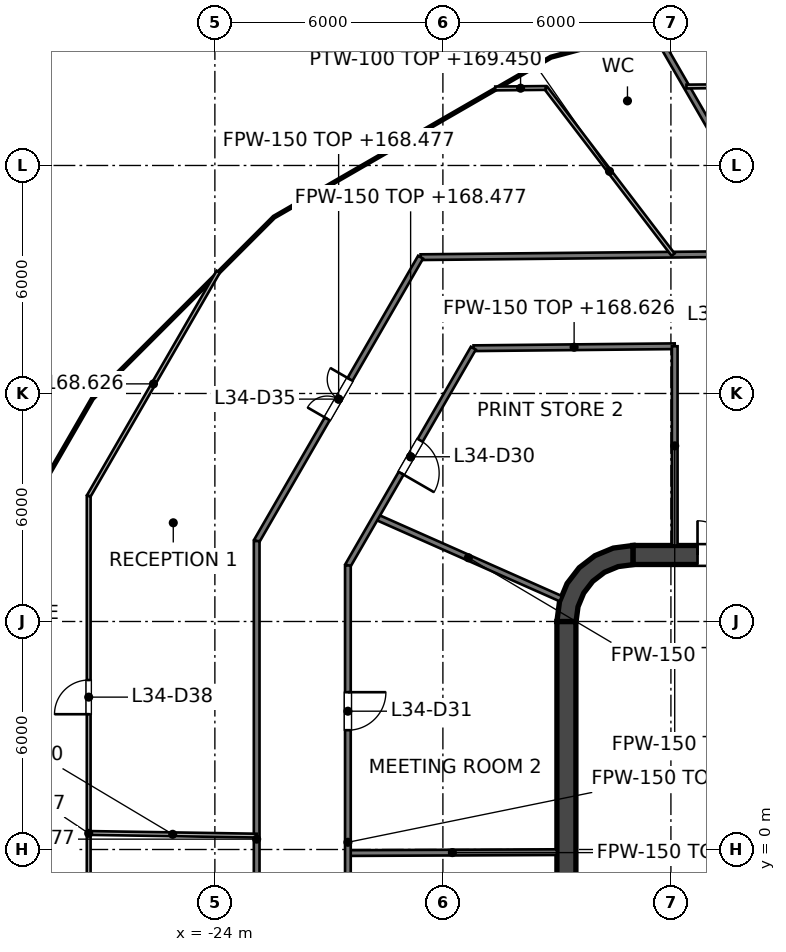
"""IFC4 building model, lengths in metres.
Left out: names, types, materials, properties, quantities, classifications, styles, units other than length and angle.
Written with IfcOpenShell. Run it as: python <this file> out.ifc"""

import sys

from ifc_helpers import new_model, si_unit, direction, frame, frame_2d, origin, place, context, subcontext, project, spatial, polyline, rectangle, outline, extrude, element, fill, save


model = new_model("IFC4")
c1 = context("Model", 3, precision=1e-05, world=origin(), true_north=direction((0.0, 1.0)))
c2 = subcontext(c1, "Body", "Model", "MODEL_VIEW")
j1 = project(units=[si_unit("LENGTHUNIT", "METRE"), si_unit("PLANEANGLEUNIT", "RADIAN")], contexts=[c1])
p1 = place(None, origin())
s1 = spatial("IfcSite", under=j1, at=p1, CompositionType="ELEMENT")
p2 = place(p1, origin())
s2 = spatial("IfcBuilding", under=s1, at=p2, CompositionType="ELEMENT")
p3 = place(p2, frame((0.0, 0.0, 165.6)))
s3 = spatial("IfcBuildingStorey", under=s2, at=p3, CompositionType="ELEMENT", Elevation=165.6)
p4 = place(p3, frame((-13.0, 7.75, 0.0), z_axis=(0.0, 0.0, 1.0), x_axis=(1.0, 0.0, 0.0)))
e1 = element("IfcWall", 1, at=p4, inside=s3, PredefinedType="SHEAR", context=c2, shape_type="SweptSolid", body=[
    extrude(rectangle(XDim=26.0, YDim=0.5, at=frame_2d((13.0, 0.0))), origin(), (0.0, 0.0, 1.0), 4.0),
])
p5 = place(p4, frame((1.7, 0.0, 0.0)))
e2 = element("IfcOpeningElement", 2, at=p5, cuts=e1, PredefinedType="OPENING", context=c2, shape_type="SweptSolid", body=[
    extrude(rectangle(XDim=1.8, YDim=2.1, at=frame_2d((0.9, 1.05))), frame((0.0, 0.25, 0.0), z_axis=(0.0, -1.0, 0.0), x_axis=(1.0, 0.0, 0.0)), (0.0, 0.0, 1.0), 0.5),
])
p6 = place(p4, frame((22.5, 0.0, 0.0)))
e3 = element("IfcOpeningElement", 3, at=p6, cuts=e1, PredefinedType="OPENING", context=c2, shape_type="SweptSolid", body=[
    extrude(rectangle(XDim=1.8, YDim=2.1, at=frame_2d((0.9, 1.05))), frame((0.0, 0.25, 0.0), z_axis=(0.0, -1.0, 0.0), x_axis=(1.0, 0.0, 0.0)), (0.0, 0.0, 1.0), 0.5),
])
p7 = place(p3, frame((-14.75, -6.0, 0.0), z_axis=(0.0, 0.0, 1.0), x_axis=(0.0, 1.0, 0.0)))
e4 = element("IfcWall", 4, at=p7, inside=s3, PredefinedType="SHEAR", context=c2, shape_type="SweptSolid", body=[
    extrude(rectangle(XDim=12.0, YDim=0.5, at=frame_2d((6.0, 0.0))), origin(), (0.0, 0.0, 1.0), 4.0),
])
p8 = place(p3, origin())
e5 = element("IfcWall", 5, at=p8, inside=s3, PredefinedType="SHEAR", context=c2, shape_type="SweptSolid", body=[
    extrude(outline(polyline([(-15.0, 6.0), (-14.496, 6.0), (-14.445, 6.387), (-14.295, 6.748), (-14.058, 7.058), (-13.748, 7.295), (-13.387, 7.445), (-13.0, 7.496), (-13.0, 8.0), (-13.518, 7.932), (-14.0, 7.732), (-14.414, 7.414), (-14.732, 7.0), (-14.932, 6.518), (-15.0, 6.0)])), origin(), (0.0, 0.0, 1.0), 4.0),
])
p9 = place(p3, frame((-11.8, -7.5, 0.0), z_axis=(0.0, 0.0, 1.0), x_axis=(0.0, 1.0, 0.0)))
e6 = element("IfcWall", 6, at=p9, inside=s3, PredefinedType="SOLIDWALL", context=c2, shape_type="SweptSolid", body=[
    extrude(rectangle(XDim=15.0, YDim=0.4, at=frame_2d((7.5, 0.0))), origin(), (0.0, 0.0, 1.0), 3.85),
])
p10 = place(p9, frame((11.3, 0.0, 0.0)))
e7 = element("IfcOpeningElement", 7, at=p10, cuts=e6, PredefinedType="OPENING", context=c2, shape_type="SweptSolid", body=[
    extrude(rectangle(XDim=1.1, YDim=2.1, at=frame_2d((0.55, 1.05))), frame((0.0, 0.2, 0.0), z_axis=(0.0, -1.0, 0.0), x_axis=(1.0, 0.0, 0.0)), (0.0, 0.0, 1.0), 0.4),
])
p11 = place(p9, frame((8.4, 0.0, 0.0)))
e8 = element("IfcOpeningElement", 8, at=p11, cuts=e6, PredefinedType="OPENING", context=c2, shape_type="SweptSolid", body=[
    extrude(rectangle(XDim=1.1, YDim=2.1, at=frame_2d((0.55, 1.05))), frame((0.0, 0.2, 0.0), z_axis=(0.0, -1.0, 0.0), x_axis=(1.0, 0.0, 0.0)), (0.0, 0.0, 1.0), 0.4),
])
p12 = place(p9, frame((5.5, 0.0, 0.0)))
e9 = element("IfcOpeningElement", 9, at=p12, cuts=e6, PredefinedType="OPENING", context=c2, shape_type="SweptSolid", body=[
    extrude(rectangle(XDim=1.1, YDim=2.1, at=frame_2d((0.55, 1.05))), frame((0.0, 0.2, 0.0), z_axis=(0.0, -1.0, 0.0), x_axis=(1.0, 0.0, 0.0)), (0.0, 0.0, 1.0), 0.4),
])
p13 = place(p9, frame((13.697, 0.0, 0.0)))
e10 = element("IfcOpeningElement", 10, at=p13, cuts=e6, PredefinedType="OPENING", context=c2, shape_type="SweptSolid", body=[
    extrude(rectangle(XDim=0.9, YDim=2.1, at=frame_2d((0.45, 1.05))), frame((0.0, 0.2, 0.0), z_axis=(0.0, -1.0, 0.0), x_axis=(1.0, 0.0, 0.0)), (0.0, 0.0, 1.0), 0.4),
])
p14 = place(p9, frame((0.403, 0.0, 0.0)))
e11 = element("IfcOpeningElement", 11, at=p14, cuts=e6, PredefinedType="OPENING", context=c2, shape_type="SweptSolid", body=[
    extrude(rectangle(XDim=0.9, YDim=2.1, at=frame_2d((0.45, 1.05))), frame((0.0, 0.2, 0.0), z_axis=(0.0, -1.0, 0.0), x_axis=(1.0, 0.0, 0.0)), (0.0, 0.0, 1.0), 0.4),
])
e12 = element("IfcWall", 12, at=p8, inside=s3, PredefinedType="SOLIDWALL", context=c2, shape_type="SweptSolid", body=[
    extrude(outline(polyline([(-12.0, -5.925), (-12.0, -5.675), (-14.25, -5.675), (-14.25, -3.025), (-12.0, -3.025), (-12.0, -2.775), (-14.25, -2.775), (-14.25, -0.125), (-12.0, -0.125), (-12.0, 0.125), (-14.25, 0.125), (-14.25, 2.775), (-12.0, 2.775), (-12.0, 3.025), (-14.25, 3.025), (-14.25, 5.675), (-12.0, 5.675), (-12.0, 5.925), (-14.25, 5.925), (-14.5, 5.925), (-14.5, 5.675), (-14.5, 3.025), (-14.5, 2.775), (-14.5, 0.125), (-14.5, -0.125), (-14.5, -2.775), (-14.5, -3.025), (-14.5, -5.675), (-14.5, -5.925), (-14.25, -5.925), (-12.0, -5.925)])), origin(), (0.0, 0.0, 1.0), 3.85),
])
p15 = place(p3, frame((-12.466, 21.592, 0.0), z_axis=(0.0, 0.0, 1.0), x_axis=(0.500029032144, -0.866008641419, 0.0)))
e13 = element("IfcWall", 13, at=p15, inside=s3, PredefinedType="PARTITIONING", context=c2, shape_type="SweptSolid", body=[
    extrude(rectangle(XDim=6.824, YDim=0.15, at=frame_2d((3.412, 0.0))), origin(), (0.0, 0.0, 1.0), 3.252),
])
p16 = place(p3, frame((-19.76, 8.755, 0.0), z_axis=(0.0, 0.0, 1.0), x_axis=(0.91424834547, -0.405154245695, 0.0)))
e14 = element("IfcWall", 14, at=p16, inside=s3, PredefinedType="PARTITIONING", context=c2, shape_type="SweptSolid", body=[
    extrude(rectangle(XDim=5.318, YDim=0.15, at=frame_2d((2.659, 0.0))), origin(), (0.0, 0.0, 1.0), 3.026),
])
p17 = place(p3, frame((-20.5, -0.094, 0.0), z_axis=(0.0, 0.0, 1.0), x_axis=(0.999990148138, 0.004438876723, 0.0)))
e15 = element("IfcWall", 15, at=p17, inside=s3, PredefinedType="PARTITIONING", context=c2, shape_type="SweptSolid", body=[
    extrude(rectangle(XDim=5.5, YDim=0.15, at=frame_2d((2.75, 0.0))), origin(), (0.0, 0.0, 1.0), 2.995),
])
p18 = place(p3, frame((-17.194, 13.191, 0.0), z_axis=(0.0, 0.0, 1.0), x_axis=(0.999950853109, 0.009914200296, 0.0)))
e16 = element("IfcWall", 16, at=p18, inside=s3, PredefinedType="PARTITIONING", context=c2, shape_type="SweptSolid", body=[
    extrude(rectangle(XDim=5.294, YDim=0.15, at=frame_2d((2.647, 0.0))), origin(), (0.0, 0.0, 1.0), 3.026),
])
p19 = place(p3, frame((-18.587, 15.587, 0.0), z_axis=(0.0, 0.0, 1.0), x_axis=(0.999950941879, 0.009905242833, 0.0)))
e17 = element("IfcWall", 17, at=p19, inside=s3, PredefinedType="PARTITIONING", context=c2, shape_type="SweptSolid", body=[
    extrude(rectangle(XDim=33.669, YDim=0.15, at=frame_2d((16.834, 0.0))), origin(), (0.0, 0.0, 1.0), 2.877),
])
p20 = place(p19, frame((7.591, 0.0, 0.0)))
e18 = element("IfcOpeningElement", 18, at=p20, cuts=e17, PredefinedType="OPENING", context=c2, shape_type="SweptSolid", body=[
    extrude(rectangle(XDim=1.0, YDim=2.1, at=frame_2d((0.5, 1.05))), frame((0.0, 0.075, 0.0), z_axis=(0.0, -1.0, 0.0), x_axis=(1.0, 0.0, 0.0)), (0.0, 0.0, 1.0), 0.15),
])
p21 = place(p19, frame((27.746, 0.0, 0.0)))
e19 = element("IfcOpeningElement", 19, at=p21, cuts=e17, PredefinedType="OPENING", context=c2, shape_type="SweptSolid", body=[
    extrude(rectangle(XDim=1.0, YDim=2.1, at=frame_2d((0.5, 1.05))), frame((0.0, 0.075, 0.0), z_axis=(0.0, -1.0, 0.0), x_axis=(1.0, 0.0, 0.0)), (0.0, 0.0, 1.0), 0.15),
])
p22 = place(p19, frame((16.335, 0.0, 0.0)))
e20 = element("IfcOpeningElement", 20, at=p22, cuts=e17, PredefinedType="OPENING", context=c2, shape_type="SweptSolid", body=[
    extrude(rectangle(XDim=1.0, YDim=2.1, at=frame_2d((0.5, 1.05))), frame((0.0, 0.075, 0.0), z_axis=(0.0, -1.0, 0.0), x_axis=(1.0, 0.0, 0.0)), (0.0, 0.0, 1.0), 0.15),
])
p23 = place(p3, frame((-20.5, 7.474, 0.0), z_axis=(0.0, 0.0, 1.0), x_axis=(0.500012665616, 0.866018091164, 0.0)))
e21 = element("IfcWall", 21, at=p23, inside=s3, PredefinedType="PARTITIONING", context=c2, shape_type="SweptSolid", body=[
    extrude(rectangle(XDim=6.602, YDim=0.15, at=frame_2d((3.301, 0.0))), origin(), (0.0, 0.0, 1.0), 2.877),
])
p24 = place(p23, frame((2.803, 0.0, 0.0)))
e22 = element("IfcOpeningElement", 22, at=p24, cuts=e21, PredefinedType="OPENING", context=c2, shape_type="SweptSolid", body=[
    extrude(rectangle(XDim=1.0, YDim=2.1, at=frame_2d((0.5, 1.05))), frame((0.0, 0.075, 0.0), z_axis=(0.0, -1.0, 0.0), x_axis=(1.0, 0.0, 0.0)), (0.0, 0.0, 1.0), 0.15),
])
p25 = place(p3, frame((-22.9, 8.117, 0.0), z_axis=(0.0, 0.0, 1.0), x_axis=(0.500017275495, 0.866015429543, 0.0)))
e23 = element("IfcWall", 23, at=p25, inside=s3, PredefinedType="PARTITIONING", context=c2, shape_type="SweptSolid", body=[
    extrude(rectangle(XDim=8.626, YDim=0.15, at=frame_2d((4.313, 0.0))), origin(), (0.0, 0.0, 1.0), 2.877),
])
p26 = place(p25, frame((3.713, 0.0, 0.0)))
e24 = element("IfcOpeningElement", 24, at=p26, cuts=e23, PredefinedType="OPENING", context=c2, shape_type="SweptSolid", body=[
    extrude(rectangle(XDim=1.2, YDim=2.1, at=frame_2d((0.6, 1.05))), frame((0.0, 0.075, 0.0), z_axis=(0.0, -1.0, 0.0), x_axis=(1.0, 0.0, 0.0)), (0.0, 0.0, 1.0), 0.15),
])
p27 = place(p3, frame((-11.9, 8.0, 0.0), z_axis=(0.0, 0.0, 1.0), x_axis=(0.0, 1.0, 0.0)))
e25 = element("IfcWall", 25, at=p27, inside=s3, PredefinedType="PARTITIONING", context=c2, shape_type="SweptSolid", body=[
    extrude(rectangle(XDim=5.243, YDim=0.15, at=frame_2d((2.622, 0.0))), origin(), (0.0, 0.0, 1.0), 2.877),
])
p28 = place(p3, frame((-20.5, -7.095, 0.0), z_axis=(0.0, 0.0, 1.0), x_axis=(0.0, 1.0, 0.0)))
e26 = element("IfcWall", 26, at=p28, inside=s3, PredefinedType="PARTITIONING", context=c2, shape_type="SweptSolid", body=[
    extrude(rectangle(XDim=14.569, YDim=0.15, at=frame_2d((7.285, 0.0))), origin(), (0.0, 0.0, 1.0), 2.877),
])
p29 = place(p28, frame((10.234, 0.0, 0.0)))
e27 = element("IfcOpeningElement", 27, at=p29, cuts=e26, PredefinedType="OPENING", context=c2, shape_type="SweptSolid", body=[
    extrude(rectangle(XDim=1.0, YDim=2.1, at=frame_2d((0.5, 1.05))), frame((0.0, 0.075, 0.0), z_axis=(0.0, -1.0, 0.0), x_axis=(1.0, 0.0, 0.0)), (0.0, 0.0, 1.0), 0.15),
])
p30 = place(p28, frame((3.0, 0.0, 0.0)))
e28 = element("IfcOpeningElement", 28, at=p30, cuts=e26, PredefinedType="OPENING", context=c2, shape_type="SweptSolid", body=[
    extrude(rectangle(XDim=1.0, YDim=2.1, at=frame_2d((0.5, 1.05))), frame((0.0, 0.075, 0.0), z_axis=(0.0, -1.0, 0.0), x_axis=(1.0, 0.0, 0.0)), (0.0, 0.0, 1.0), 0.15),
])
p31 = place(p3, frame((-22.9, -7.572, 0.0), z_axis=(0.0, 0.0, 1.0), x_axis=(0.0, 1.0, 0.0)))
e29 = element("IfcWall", 29, at=p31, inside=s3, PredefinedType="PARTITIONING", context=c2, shape_type="SweptSolid", body=[
    extrude(rectangle(XDim=15.689, YDim=0.15, at=frame_2d((7.844, 0.0))), origin(), (0.0, 0.0, 1.0), 2.877),
])
p32 = place(p31, frame((5.614, 0.0, 0.0)))
e30 = element("IfcOpeningElement", 30, at=p32, cuts=e29, PredefinedType="OPENING", context=c2, shape_type="SweptSolid", body=[
    extrude(rectangle(XDim=1.0, YDim=2.1, at=frame_2d((0.5, 1.05))), frame((0.0, 0.075, 0.0), z_axis=(0.0, -1.0, 0.0), x_axis=(1.0, 0.0, 0.0)), (0.0, 0.0, 1.0), 0.15),
])
p33 = place(p31, frame((2.361, 0.0, 0.0)))
e31 = element("IfcOpeningElement", 31, at=p33, cuts=e29, PredefinedType="OPENING", context=c2, shape_type="SweptSolid", body=[
    extrude(rectangle(XDim=1.0, YDim=2.1, at=frame_2d((0.5, 1.05))), frame((0.0, 0.075, 0.0), z_axis=(0.0, -1.0, 0.0), x_axis=(1.0, 0.0, 0.0)), (0.0, 0.0, 1.0), 0.15),
])
p34 = place(p3, frame((-15.29, 20.04, 0.0), z_axis=(0.0, 0.0, 1.0), x_axis=(0.606556319782, -0.795040521567, 0.0)))
e32 = element("IfcWall", 32, at=p34, inside=s3, PredefinedType="PARTITIONING", context=c2, shape_type="SweptSolid", body=[
    extrude(rectangle(XDim=5.518, YDim=0.1, at=frame_2d((2.759, 0.0))), origin(), (0.0, 0.0, 1.0), 3.85),
])
p35 = place(p3, frame((-27.32, 0.435, 0.0), z_axis=(0.0, 0.0, 1.0), x_axis=(0.999874381125, -0.015849983285, 0.0)))
e33 = element("IfcWall", 33, at=p35, inside=s3, PredefinedType="PARTITIONING", context=c2, shape_type="SweptSolid", body=[
    extrude(rectangle(XDim=4.421, YDim=0.1, at=frame_2d((2.21, 0.0))), origin(), (0.0, 0.0, 1.0), 3.85),
])
p36 = place(p3, frame((-16.622, 20.027, 0.0), z_axis=(0.0, 0.0, 1.0), x_axis=(0.9999528217, 0.009713617953, 0.0)))
e34 = element("IfcWall", 34, at=p36, inside=s3, PredefinedType="PARTITIONING", context=c2, shape_type="SweptSolid", body=[
    extrude(rectangle(XDim=1.332, YDim=0.1, at=frame_2d((0.666, 0.0))), origin(), (0.0, 0.0, 1.0), 3.323),
])
p37 = place(p3, frame((-11.591, 20.077, 0.0), z_axis=(0.0, 0.0, 1.0), x_axis=(0.999951286901, 0.009870350766, 0.0)))
e35 = element("IfcWall", 35, at=p37, inside=s3, PredefinedType="PARTITIONING", context=c2, shape_type="SweptSolid", body=[
    extrude(rectangle(XDim=27.654, YDim=0.1, at=frame_2d((13.827, 0.0))), origin(), (0.0, 0.0, 1.0), 2.927),
])
p38 = place(p37, frame((8.11, 0.0, 0.0)))
e36 = element("IfcOpeningElement", 36, at=p38, cuts=e35, PredefinedType="OPENING", context=c2, shape_type="SweptSolid", body=[
    extrude(rectangle(XDim=0.9, YDim=2.1, at=frame_2d((0.45, 1.05))), frame((0.0, 0.05, 0.0), z_axis=(0.0, -1.0, 0.0), x_axis=(1.0, 0.0, 0.0)), (0.0, 0.0, 1.0), 0.1),
])
p39 = place(p3, frame((-27.32, 9.301, 0.0), z_axis=(0.0, 0.0, 1.0), x_axis=(0.500025204458, 0.866010851495, 0.0)))
e37 = element("IfcWall", 37, at=p39, inside=s3, PredefinedType="PARTITIONING", context=c2, shape_type="SweptSolid", body=[
    extrude(rectangle(XDim=6.818, YDim=0.1, at=frame_2d((3.409, 0.0))), origin(), (0.0, 0.0, 1.0), 3.026),
])
p40 = place(p3, frame((-27.32, -8.452, 0.0), z_axis=(0.0, 0.0, 1.0), x_axis=(0.0, 1.0, 0.0)))
e38 = element("IfcWall", 38, at=p40, inside=s3, PredefinedType="PARTITIONING", context=c2, shape_type="SweptSolid", body=[
    extrude(rectangle(XDim=17.753, YDim=0.1, at=frame_2d((8.876, 0.0))), origin(), (0.0, 0.0, 1.0), 2.877),
])
p41 = place(p40, frame((12.012, 0.0, 0.0)))
e39 = element("IfcOpeningElement", 39, at=p41, cuts=e38, PredefinedType="OPENING", context=c2, shape_type="SweptSolid", body=[
    extrude(rectangle(XDim=0.9, YDim=2.1, at=frame_2d((0.45, 1.05))), frame((0.0, 0.05, 0.0), z_axis=(0.0, -1.0, 0.0), x_axis=(1.0, 0.0, 0.0)), (0.0, 0.0, 1.0), 0.1),
])
p42 = place(p10, origin())
e40 = element("IfcDoor", 40, at=p42, inside=s3, OperationType="DOUBLE_DOOR_SLIDING", PredefinedType="DOOR", context=c2, shape_type="SweptSolid", body=[
    extrude(rectangle(XDim=1.1, YDim=2.1, at=frame_2d((0.55, 1.05))), frame((0.0, 0.025, 0.0), z_axis=(0.0, -1.0, 0.0), x_axis=(1.0, 0.0, 0.0)), (0.0, 0.0, 1.0), 0.05),
])
fill(e7, e40)
p43 = place(p11, origin())
e41 = element("IfcDoor", 41, at=p43, inside=s3, OperationType="DOUBLE_DOOR_SLIDING", PredefinedType="DOOR", context=c2, shape_type="SweptSolid", body=[
    extrude(rectangle(XDim=1.1, YDim=2.1, at=frame_2d((0.55, 1.05))), frame((0.0, 0.025, 0.0), z_axis=(0.0, -1.0, 0.0), x_axis=(1.0, 0.0, 0.0)), (0.0, 0.0, 1.0), 0.05),
])
fill(e8, e41)
p44 = place(p13, origin())
e42 = element("IfcDoor", 42, at=p44, inside=s3, OperationType="SINGLE_SWING_LEFT", PredefinedType="DOOR", context=c2, shape_type="SweptSolid", body=[
    extrude(rectangle(XDim=0.9, YDim=2.1, at=frame_2d((0.45, 1.05))), frame((0.0, 0.025, 0.0), z_axis=(0.0, -1.0, 0.0), x_axis=(1.0, 0.0, 0.0)), (0.0, 0.0, 1.0), 0.05),
])
fill(e10, e42)
p45 = place(p5, origin())
e43 = element("IfcDoor", 43, at=p45, inside=s3, OperationType="DOUBLE_DOOR_SINGLE_SWING", PredefinedType="DOOR", context=c2, shape_type="SweptSolid", body=[
    extrude(rectangle(XDim=1.8, YDim=2.1, at=frame_2d((0.9, 1.05))), frame((0.0, 0.025, 0.0), z_axis=(0.0, -1.0, 0.0), x_axis=(1.0, 0.0, 0.0)), (0.0, 0.0, 1.0), 0.05),
])
fill(e2, e43)
p46 = place(p24, origin())
e44 = element("IfcDoor", 44, at=p46, inside=s3, OperationType="SINGLE_SWING_LEFT", PredefinedType="DOOR", context=c2, shape_type="SweptSolid", body=[
    extrude(rectangle(XDim=1.0, YDim=2.1, at=frame_2d((0.5, 1.05))), frame((0.0, 0.025, 0.0), z_axis=(0.0, -1.0, 0.0), x_axis=(1.0, 0.0, 0.0)), (0.0, 0.0, 1.0), 0.05),
])
fill(e22, e44)
p47 = place(p29, origin())
e45 = element("IfcDoor", 45, at=p47, inside=s3, OperationType="SINGLE_SWING_RIGHT", PredefinedType="DOOR", context=c2, shape_type="SweptSolid", body=[
    extrude(rectangle(XDim=1.0, YDim=2.1, at=frame_2d((0.5, 1.05))), frame((0.0, 0.025, 0.0), z_axis=(0.0, -1.0, 0.0), x_axis=(1.0, 0.0, 0.0)), (0.0, 0.0, 1.0), 0.05),
])
fill(e27, e45)
p48 = place(p26, origin())
e46 = element("IfcDoor", 46, at=p48, inside=s3, OperationType="DOUBLE_DOOR_SINGLE_SWING", PredefinedType="DOOR", context=c2, shape_type="SweptSolid", body=[
    extrude(rectangle(XDim=1.2, YDim=2.1, at=frame_2d((0.6, 1.05))), frame((0.0, 0.025, 0.0), z_axis=(0.0, -1.0, 0.0), x_axis=(1.0, 0.0, 0.0)), (0.0, 0.0, 1.0), 0.05),
])
fill(e24, e46)
p49 = place(p41, origin())
e47 = element("IfcDoor", 47, at=p49, inside=s3, OperationType="SINGLE_SWING_LEFT", PredefinedType="DOOR", context=c2, shape_type="SweptSolid", body=[
    extrude(rectangle(XDim=0.9, YDim=2.1, at=frame_2d((0.45, 1.05))), frame((0.0, 0.025, 0.0), z_axis=(0.0, -1.0, 0.0), x_axis=(1.0, 0.0, 0.0)), (0.0, 0.0, 1.0), 0.05),
])
fill(e39, e47)
save(model, sys.argv[1])
